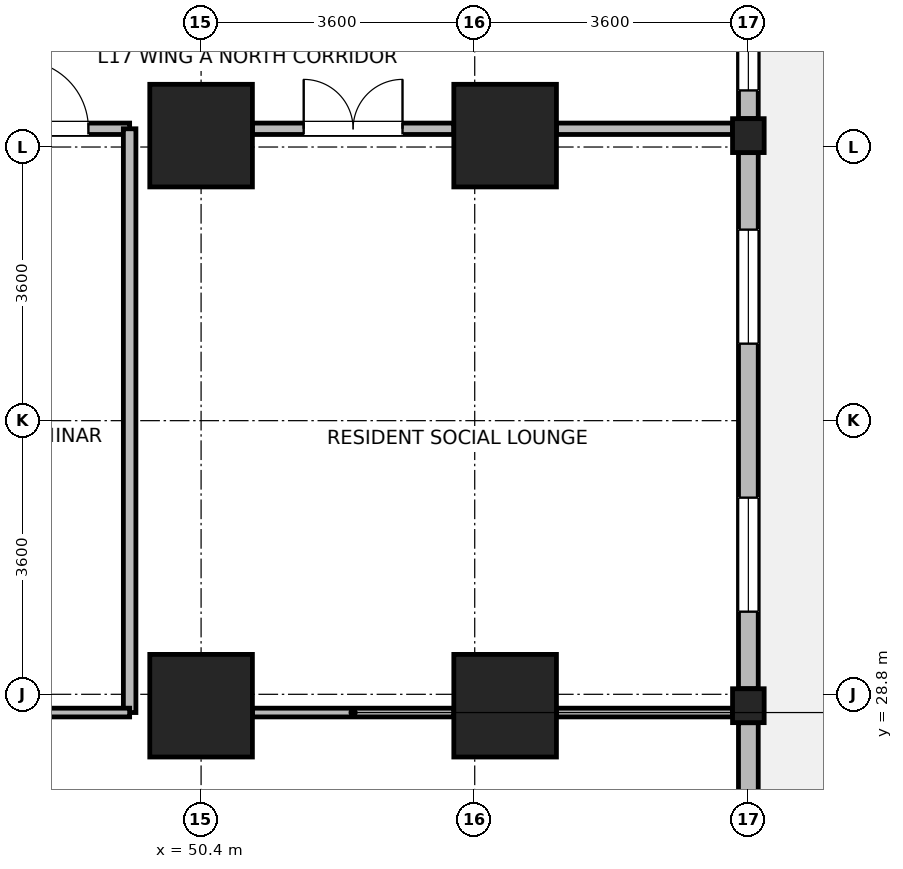
"""IFC4 building model, lengths in metres.
Left out: names, types, materials, properties, quantities, classifications, styles, units other than length and angle.
Written with IfcOpenShell. Run it as: python <this file> out.ifc"""

import sys

from ifc_helpers import new_model, si_unit, direction, frame, frame_2d, origin, origin_2d, place, context, subcontext, project, spatial, rectangle, i_section, extrude, source, transform, mapped, element, fill, save


model = new_model("IFC4")
c1 = context("Model", 3, precision=1e-05, world=origin(), true_north=direction((0.0, 1.0)))
c2 = subcontext(c1, "Body", "Model", "MODEL_VIEW")
j1 = project(units=[si_unit("LENGTHUNIT", "METRE"), si_unit("PLANEANGLEUNIT", "RADIAN")], contexts=[c1])
p1 = place(None, origin())
s1 = spatial("IfcSite", under=j1, at=p1, CompositionType="ELEMENT")
p2 = place(p1, origin())
s2 = spatial("IfcBuilding", under=s1, at=p2, CompositionType="ELEMENT")
p3 = place(p2, frame((0.0, 0.0, 69.7)))
s3 = spatial("IfcBuildingStorey", under=s2, at=p3, CompositionType="ELEMENT", Elevation=69.7)
m1 = source(origin(), c2, "Body", "SweptSolid", [
    extrude(rectangle(XDim=1.35, YDim=1.35, at=origin_2d()), origin(), (0.0, 0.0, 1.0), 3.7),
])
for number, where, z_axis, x_axis in (
    (1, (50.4, 28.65, 0.0), (0.0, 0.0, 1.0), (1.0, 0.0, 0.0)),
    (2, (50.4, 36.15, 0.0), (0.0, 0.0, 1.0), (1.0, 0.0, 0.0)),
    (3, (54.4, 28.65, 0.0), (0.0, 0.0, 1.0), (1.0, 0.0, 0.0)),
    (4, (54.4, 36.15, 0.0), (0.0, 0.0, 1.0), (1.0, 0.0, 0.0)),
):
    element("IfcColumn", number, at=place(p3, frame(where, z_axis=z_axis, x_axis=x_axis)), inside=s3, PredefinedType="COLUMN", context=c2, shape_type="MappedRepresentation", body=[
        mapped(m1, transform((0.0, 0.0, 0.0), x_axis=(1.0, 0.0, 0.0), y_axis=(0.0, 1.0, 0.0), z_axis=(0.0, 0.0, 1.0), scale=1.0)),
    ])
m2 = source(origin(), c2, "Body", "SweptSolid", [
    extrude(i_section(OverallWidth=0.416, OverallDepth=0.446, WebThickness=0.029, FlangeThickness=0.04, FilletRadius=0.015, at=origin_2d()), origin(), (0.0, 0.0, 1.0), 3.7),
])
for number, where, z_axis, x_axis in (
    (5, (57.6, 28.65, 0.0), (0.0, 0.0, 1.0), (1.0, 0.0, 0.0)),
    (6, (57.6, 36.15, 0.0), (0.0, 0.0, 1.0), (1.0, 0.0, 0.0)),
):
    element("IfcColumn", number, at=place(p3, frame(where, z_axis=z_axis, x_axis=x_axis)), inside=s3, PredefinedType="COLUMN", context=c2, shape_type="MappedRepresentation", body=[
        mapped(m2, transform((0.0, 0.0, 0.0), x_axis=(1.0, 0.0, 0.0), y_axis=(0.0, 1.0, 0.0), z_axis=(0.0, 0.0, 1.0), scale=1.0)),
    ])
p4 = place(p3, frame((57.6, 28.426, 0.0), z_axis=(0.0, 0.0, 1.0), x_axis=(0.0, -1.0, 0.0)))
e7 = element("IfcWall", 7, at=p4, inside=s3, PredefinedType="STANDARD", context=c2, shape_type="SweptSolid", body=[
    extrude(rectangle(XDim=6.602, YDim=0.26, at=frame_2d((3.301, 0.0))), origin(), (0.0, 0.0, 1.0), 2.82),
])
p5 = place(p4, frame((4.201, 0.0, 0.85)))
e8 = element("IfcOpeningElement", 8, at=p5, cuts=e7, PredefinedType="OPENING", context=c2, shape_type="SweptSolid", body=[
    extrude(rectangle(XDim=1.5, YDim=1.85, at=frame_2d((0.75, 0.925))), frame((0.0, 0.14, 0.0), z_axis=(0.0, -1.0, 0.0), x_axis=(1.0, 0.0, 0.0)), (0.0, 0.0, 1.0), 0.28),
])
p6 = place(p4, frame((2.826, 0.0, 0.85)))
e9 = element("IfcOpeningElement", 9, at=p6, cuts=e7, PredefinedType="OPENING", context=c2, shape_type="SweptSolid", body=[
    extrude(rectangle(XDim=0.95, YDim=1.75, at=frame_2d((0.475, 0.875))), frame((0.0, 0.14, 0.0), z_axis=(0.0, -1.0, 0.0), x_axis=(1.0, 0.0, 0.0)), (0.0, 0.0, 1.0), 0.28),
])
p7 = place(p3, frame((57.6, 35.926, 0.0), z_axis=(0.0, 0.0, 1.0), x_axis=(0.0, -1.0, 0.0)))
e10 = element("IfcWall", 10, at=p7, inside=s3, PredefinedType="STANDARD", context=c2, shape_type="SweptSolid", body=[
    extrude(rectangle(XDim=7.052, YDim=0.26, at=frame_2d((3.526, 0.0))), origin(), (0.0, 0.0, 1.0), 2.82),
])
p8 = place(p7, frame((1.013, 0.0, 0.85)))
e11 = element("IfcOpeningElement", 11, at=p8, cuts=e10, PredefinedType="OPENING", context=c2, shape_type="SweptSolid", body=[
    extrude(rectangle(XDim=1.5, YDim=1.85, at=frame_2d((0.75, 0.925))), frame((0.0, 0.14, 0.0), z_axis=(0.0, -1.0, 0.0), x_axis=(1.0, 0.0, 0.0)), (0.0, 0.0, 1.0), 0.28),
])
p9 = place(p7, frame((4.539, 0.0, 0.85)))
e12 = element("IfcOpeningElement", 12, at=p9, cuts=e10, PredefinedType="OPENING", context=c2, shape_type="SweptSolid", body=[
    extrude(rectangle(XDim=1.5, YDim=1.85, at=frame_2d((0.75, 0.925))), frame((0.0, 0.14, 0.0), z_axis=(0.0, -1.0, 0.0), x_axis=(1.0, 0.0, 0.0)), (0.0, 0.0, 1.0), 0.28),
])
p10 = place(p3, frame((57.6, 39.73, 0.0), z_axis=(0.0, 0.0, 1.0), x_axis=(0.0, -1.0, 0.0)))
e13 = element("IfcWall", 13, at=p10, inside=s3, PredefinedType="STANDARD", context=c2, shape_type="SweptSolid", body=[
    extrude(rectangle(XDim=3.356, YDim=0.26, at=frame_2d((1.678, 0.0))), origin(), (0.0, 0.0, 1.0), 3.32),
])
p11 = place(p10, frame((2.035, 0.0, 0.85)))
e14 = element("IfcOpeningElement", 14, at=p11, cuts=e13, PredefinedType="OPENING", context=c2, shape_type="SweptSolid", body=[
    extrude(rectangle(XDim=0.95, YDim=1.75, at=frame_2d((0.475, 0.875))), frame((0.0, 0.14, 0.0), z_axis=(0.0, -1.0, 0.0), x_axis=(1.0, 0.0, 0.0)), (0.0, 0.0, 1.0), 0.28),
])
p12 = place(p10, frame((0.263, 0.0, 0.85)))
e15 = element("IfcOpeningElement", 15, at=p12, cuts=e13, PredefinedType="OPENING", context=c2, shape_type="SweptSolid", body=[
    extrude(rectangle(XDim=0.95, YDim=1.75, at=frame_2d((0.475, 0.875))), frame((0.0, 0.14, 0.0), z_axis=(0.0, -1.0, 0.0), x_axis=(1.0, 0.0, 0.0)), (0.0, 0.0, 1.0), 0.28),
])
p13 = place(p3, frame((51.075, 36.24, 0.0), z_axis=(0.0, 0.0, 1.0), x_axis=(1.0, 0.0, 0.0)))
e16 = element("IfcWall", 16, at=p13, inside=s3, PredefinedType="PARTITIONING", context=c2, shape_type="SweptSolid", body=[
    extrude(rectangle(XDim=2.65, YDim=0.15, at=frame_2d((1.325, 0.0))), origin(), (0.0, 0.0, 1.0), 2.67),
])
p14 = place(p13, frame((0.675, 0.0, 0.0)))
e17 = element("IfcOpeningElement", 17, at=p14, cuts=e16, PredefinedType="OPENING", context=c2, shape_type="SweptSolid", body=[
    extrude(rectangle(XDim=1.3, YDim=2.12, at=frame_2d((0.65, 1.06))), frame((0.0, 0.085, 0.0), z_axis=(0.0, -1.0, 0.0), x_axis=(1.0, 0.0, 0.0)), (0.0, 0.0, 1.0), 0.17),
])
p15 = place(p3, frame((55.075, 36.24, 0.0), z_axis=(0.0, 0.0, 1.0), x_axis=(1.0, 0.0, 0.0)))
e18 = element("IfcWall", 18, at=p15, inside=s3, PredefinedType="PARTITIONING", context=c2, shape_type="SweptSolid", body=[
    extrude(rectangle(XDim=2.317, YDim=0.15, at=frame_2d((1.159, 0.0))), origin(), (0.0, 0.0, 1.0), 2.67),
])
p16 = place(p3, frame((47.475, 36.24, 0.0), z_axis=(0.0, 0.0, 1.0), x_axis=(1.0, 0.0, 0.0)))
e19 = element("IfcWall", 19, at=p16, inside=s3, PredefinedType="PARTITIONING", context=c2, shape_type="SweptSolid", body=[
    extrude(rectangle(XDim=1.985, YDim=0.15, at=frame_2d((0.992, 0.0))), origin(), (0.0, 0.0, 1.0), 2.67),
])
p17 = place(p16, frame((0.542, 0.0, 0.0)))
e20 = element("IfcOpeningElement", 20, at=p17, cuts=e19, PredefinedType="OPENING", context=c2, shape_type="SweptSolid", body=[
    extrude(rectangle(XDim=0.9, YDim=2.08, at=frame_2d((0.45, 1.04))), frame((0.0, 0.085, 0.0), z_axis=(0.0, -1.0, 0.0), x_axis=(1.0, 0.0, 0.0)), (0.0, 0.0, 1.0), 0.17),
])
p18 = place(p3, frame((51.075, 28.56, 0.0), z_axis=(0.0, 0.0, 1.0), x_axis=(1.0, 0.0, 0.0)))
e21 = element("IfcWall", 21, at=p18, inside=s3, PredefinedType="PARTITIONING", context=c2, shape_type="SweptSolid", body=[
    extrude(rectangle(XDim=2.65, YDim=0.115, at=frame_2d((1.325, 0.0))), origin(), (0.0, 0.0, 1.0), 2.67),
])
p19 = place(p3, frame((55.075, 28.56, 0.0), z_axis=(0.0, 0.0, 1.0), x_axis=(1.0, 0.0, 0.0)))
e22 = element("IfcWall", 22, at=p19, inside=s3, PredefinedType="PARTITIONING", context=c2, shape_type="SweptSolid", body=[
    extrude(rectangle(XDim=2.317, YDim=0.115, at=frame_2d((1.159, 0.0))), origin(), (0.0, 0.0, 1.0), 2.67),
])
p20 = place(p3, frame((49.46, 28.56, 0.0), z_axis=(0.0, 0.0, 1.0), x_axis=(0.0, 1.0, 0.0)))
e23 = element("IfcWall", 23, at=p20, inside=s3, PredefinedType="PARTITIONING", context=c2, shape_type="SweptSolid", body=[
    extrude(rectangle(XDim=7.68, YDim=0.165, at=frame_2d((3.84, 0.0))), origin(), (0.0, 0.0, 1.0), 3.32),
])
p21 = place(p3, frame((47.475, 28.56, 0.0), z_axis=(0.0, 0.0, 1.0), x_axis=(1.0, 0.0, 0.0)))
e24 = element("IfcWall", 24, at=p21, inside=s3, PredefinedType="PARTITIONING", context=c2, shape_type="SweptSolid", body=[
    extrude(rectangle(XDim=1.985, YDim=0.115, at=frame_2d((0.992, 0.0))), origin(), (0.0, 0.0, 1.0), 2.67),
])
p22 = place(p8, origin())
e25 = element("IfcWindow", 25, at=p22, inside=s3, PartitioningType="SINGLE_PANEL", PredefinedType="WINDOW", context=c2, shape_type="SweptSolid", body=[
    extrude(rectangle(XDim=1.5, YDim=1.85, at=frame_2d((0.75, 0.925))), frame((0.0, 0.03, 0.0), z_axis=(0.0, -1.0, 0.0), x_axis=(1.0, 0.0, 0.0)), (0.0, 0.0, 1.0), 0.06),
])
fill(e11, e25)
p23 = place(p9, origin())
e26 = element("IfcWindow", 26, at=p23, inside=s3, PartitioningType="SINGLE_PANEL", PredefinedType="WINDOW", context=c2, shape_type="SweptSolid", body=[
    extrude(rectangle(XDim=1.5, YDim=1.85, at=frame_2d((0.75, 0.925))), frame((0.0, 0.03, 0.0), z_axis=(0.0, -1.0, 0.0), x_axis=(1.0, 0.0, 0.0)), (0.0, 0.0, 1.0), 0.06),
])
fill(e12, e26)
p24 = place(p11, origin())
e27 = element("IfcWindow", 27, at=p24, inside=s3, PartitioningType="SINGLE_PANEL", PredefinedType="WINDOW", context=c2, shape_type="SweptSolid", body=[
    extrude(rectangle(XDim=0.95, YDim=1.75, at=frame_2d((0.475, 0.875))), frame((0.0, 0.03, 0.0), z_axis=(0.0, -1.0, 0.0), x_axis=(1.0, 0.0, 0.0)), (0.0, 0.0, 1.0), 0.06),
])
fill(e14, e27)
p25 = place(p14, origin())
e28 = element("IfcDoor", 28, at=p25, inside=s3, OperationType="DOUBLE_DOOR_SINGLE_SWING", PredefinedType="DOOR", context=c2, shape_type="SweptSolid", body=[
    extrude(rectangle(XDim=1.3, YDim=2.12, at=frame_2d((0.65, 1.06))), frame((0.0, 0.025, 0.0), z_axis=(0.0, -1.0, 0.0), x_axis=(1.0, 0.0, 0.0)), (0.0, 0.0, 1.0), 0.05),
])
fill(e17, e28)
p26 = place(p17, origin())
e29 = element("IfcDoor", 29, at=p26, inside=s3, OperationType="SINGLE_SWING_LEFT", PredefinedType="DOOR", context=c2, shape_type="SweptSolid", body=[
    extrude(rectangle(XDim=0.9, YDim=2.08, at=frame_2d((0.45, 1.04))), frame((0.0, 0.025, 0.0), z_axis=(0.0, -1.0, 0.0), x_axis=(1.0, 0.0, 0.0)), (0.0, 0.0, 1.0), 0.05),
])
fill(e20, e29)
save(model, sys.argv[1])
